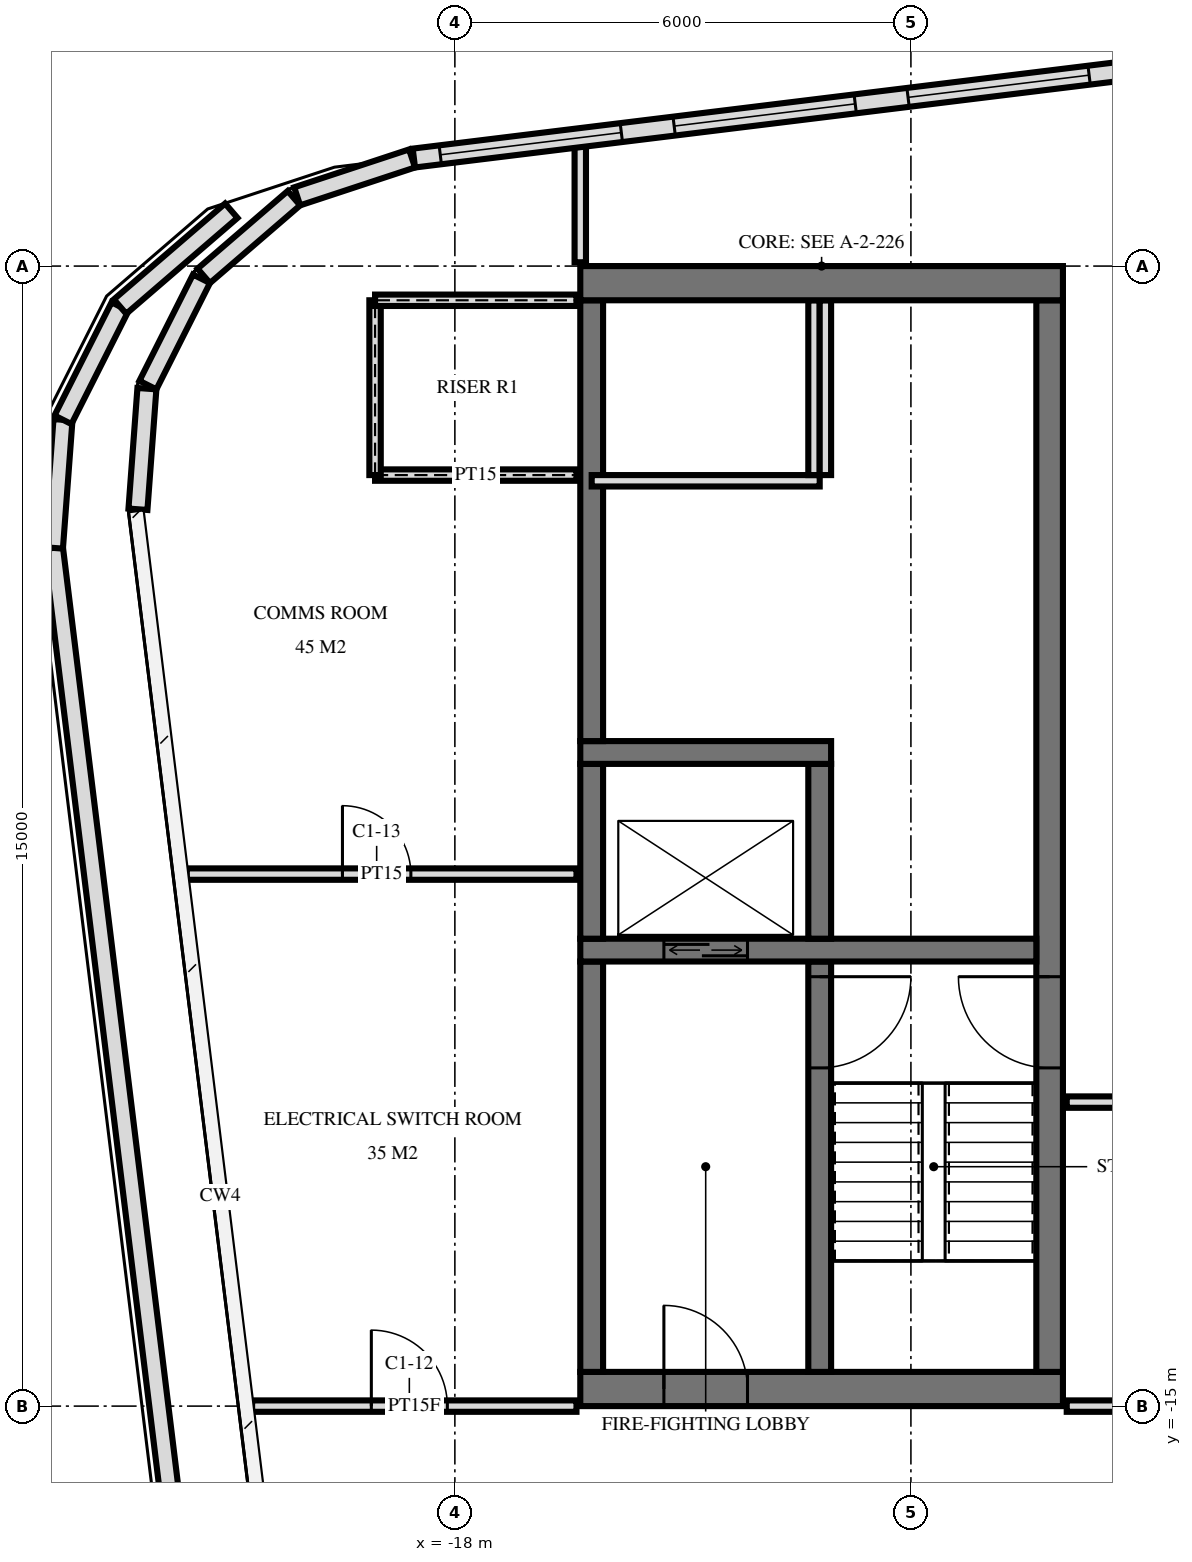
"""IFC4 building model, lengths in metres.
Left out: names, types, materials, properties, quantities, classifications, styles, units other than length and angle.
Written with IfcOpenShell. Run it as: python <this file> out.ifc"""

import sys

from ifc_helpers import new_model, si_unit, direction, frame, frame_2d, origin, place, context, subcontext, project, spatial, rectangle, extrude, element, fill, save


model = new_model("IFC4")
c1 = context("Model", 3, precision=1e-05, world=origin(), true_north=direction((0.0, 1.0)))
c2 = subcontext(c1, "Body", "Model", "MODEL_VIEW")
j1 = project(units=[si_unit("LENGTHUNIT", "METRE"), si_unit("PLANEANGLEUNIT", "RADIAN")], contexts=[c1])
p1 = place(None, origin())
s1 = spatial("IfcSite", under=j1, at=p1, CompositionType="ELEMENT")
p2 = place(p1, origin())
s2 = spatial("IfcBuilding", under=s1, at=p2, CompositionType="ELEMENT")
p3 = place(p2, frame((0.0, 0.0, 346.6)))
s3 = spatial("IfcBuildingStorey", under=s2, at=p3, CompositionType="ELEMENT", Elevation=346.6)
p4 = place(p3, frame((-16.35, -0.225, 0.0), z_axis=(0.0, 0.0, 1.0), x_axis=(1.0, 0.0, 0.0)))
e1 = element("IfcWall", 1, at=p4, inside=s3, PredefinedType="SHEAR", context=c2, shape_type="SweptSolid", body=[
    extrude(rectangle(XDim=6.35, YDim=0.45, at=frame_2d((3.175, 0.0))), origin(), (0.0, 0.0, 1.0), 3.6),
])
p5 = place(p3, frame((-16.35, -14.775, 0.0), z_axis=(0.0, 0.0, 1.0), x_axis=(1.0, 0.0, 0.0)))
e2 = element("IfcWall", 2, at=p5, inside=s3, PredefinedType="SHEAR", context=c2, shape_type="SweptSolid", body=[
    extrude(rectangle(XDim=6.35, YDim=0.45, at=frame_2d((3.175, 0.0))), origin(), (0.0, 0.0, 1.0), 3.6),
])
p6 = place(p5, frame((1.1, 0.0, 0.0)))
e3 = element("IfcOpeningElement", 3, at=p6, cuts=e2, PredefinedType="OPENING", context=c2, shape_type="SweptSolid", body=[
    extrude(rectangle(XDim=1.1, YDim=2.1, at=frame_2d((0.55, 1.05))), frame((0.0, 0.235, 0.0), z_axis=(0.0, -1.0, 0.0), x_axis=(1.0, 0.0, 0.0)), (0.0, 0.0, 1.0), 0.47),
])
p7 = place(p3, frame((-10.175, -14.55, 0.0), z_axis=(0.0, 0.0, 1.0), x_axis=(0.0, 1.0, 0.0)))
e4 = element("IfcWall", 4, at=p7, inside=s3, PredefinedType="SHEAR", context=c2, shape_type="SweptSolid", body=[
    extrude(rectangle(XDim=14.1, YDim=0.35, at=frame_2d((7.05, 0.0))), origin(), (0.0, 0.0, 1.0), 3.6),
])
p8 = place(p7, frame((4.0, 0.0, 0.0)))
e5 = element("IfcOpeningElement", 5, at=p8, cuts=e4, PredefinedType="OPENING", context=c2, shape_type="SweptSolid", body=[
    extrude(rectangle(XDim=1.2, YDim=2.1, at=frame_2d((0.6, 1.05))), frame((0.0, 0.185, 0.0), z_axis=(0.0, -1.0, 0.0), x_axis=(1.0, 0.0, 0.0)), (0.0, 0.0, 1.0), 0.37),
])
p9 = place(p3, frame((-16.2, -6.25, 0.0), z_axis=(0.0, 0.0, 1.0), x_axis=(0.0, 1.0, 0.0)))
e6 = element("IfcWall", 6, at=p9, inside=s3, PredefinedType="SHEAR", context=c2, shape_type="SweptSolid", body=[
    extrude(rectangle(XDim=5.8, YDim=0.3, at=frame_2d((2.9, 0.0))), origin(), (0.0, 0.0, 1.0), 3.6),
])
p10 = place(p3, frame((-16.2, -14.55, 0.0), z_axis=(0.0, 0.0, 1.0), x_axis=(0.0, 1.0, 0.0)))
e7 = element("IfcWall", 7, at=p10, inside=s3, PredefinedType="SHEAR", context=c2, shape_type="SweptSolid", body=[
    extrude(rectangle(XDim=5.4, YDim=0.3, at=frame_2d((2.7, 0.0))), origin(), (0.0, 0.0, 1.0), 3.6),
])
p11 = place(p3, frame((-16.35, -9.0, 0.0), z_axis=(0.0, 0.0, 1.0), x_axis=(1.0, 0.0, 0.0)))
e8 = element("IfcWall", 8, at=p11, inside=s3, PredefinedType="SHEAR", context=c2, shape_type="SweptSolid", body=[
    extrude(rectangle(XDim=6.0, YDim=0.3, at=frame_2d((3.0, 0.0))), origin(), (0.0, 0.0, 1.0), 3.6),
])
p12 = place(p11, frame((1.1, 0.0, 0.0)))
e9 = element("IfcOpeningElement", 9, at=p12, cuts=e8, PredefinedType="OPENING", context=c2, shape_type="SweptSolid", body=[
    extrude(rectangle(XDim=1.1, YDim=2.1, at=frame_2d((0.55, 1.05))), frame((0.0, 0.16, 0.0), z_axis=(0.0, -1.0, 0.0), x_axis=(1.0, 0.0, 0.0)), (0.0, 0.0, 1.0), 0.32),
])
p13 = place(p3, frame((-13.2, -14.55, 0.0), z_axis=(0.0, 0.0, 1.0), x_axis=(0.0, 1.0, 0.0)))
e10 = element("IfcWall", 10, at=p13, inside=s3, PredefinedType="SHEAR", context=c2, shape_type="SweptSolid", body=[
    extrude(rectangle(XDim=5.4, YDim=0.3, at=frame_2d((2.7, 0.0))), origin(), (0.0, 0.0, 1.0), 3.6),
])
p14 = place(p13, frame((4.0, 0.0, 0.0)))
e11 = element("IfcOpeningElement", 11, at=p14, cuts=e10, PredefinedType="OPENING", context=c2, shape_type="SweptSolid", body=[
    extrude(rectangle(XDim=1.2, YDim=2.1, at=frame_2d((0.6, 1.05))), frame((0.0, 0.16, 0.0), z_axis=(0.0, -1.0, 0.0), x_axis=(1.0, 0.0, 0.0)), (0.0, 0.0, 1.0), 0.32),
])
p15 = place(p3, frame((-16.35, -6.4, 0.0), z_axis=(0.0, 0.0, 1.0), x_axis=(1.0, 0.0, 0.0)))
e12 = element("IfcWall", 12, at=p15, inside=s3, PredefinedType="SHEAR", context=c2, shape_type="SweptSolid", body=[
    extrude(rectangle(XDim=3.3, YDim=0.3, at=frame_2d((1.65, 0.0))), origin(), (0.0, 0.0, 1.0), 3.6),
])
for number, where, z_axis, x_axis in (
    (13, (-13.2, -8.85, 0.0), (0.0, 0.0, 1.0), (0.0, 1.0, 0.0)),
    (14, (-16.2, -8.85, 0.0), (0.0, 0.0, 1.0), (0.0, 1.0, 0.0)),
):
    element("IfcWall", number, at=place(p3, frame(where, z_axis=z_axis, x_axis=x_axis)), inside=s3, PredefinedType="SHEAR", context=c2, shape_type="SweptSolid", body=[
        extrude(rectangle(XDim=2.3, YDim=0.3, at=frame_2d((1.15, 0.0))), origin(), (0.0, 0.0, 1.0), 3.6),
    ])
p16 = place(p3, frame((15.31, 5.577, 0.0), z_axis=(0.0, 0.0, 1.0), x_axis=(-0.992546767322, -0.12186432898, 0.0)))
e15 = element("IfcWall", 15, at=p16, inside=s3, PredefinedType="SOLIDWALL", context=c2, shape_type="SweptSolid", body=[
    extrude(rectangle(XDim=34.104, YDim=0.25, at=frame_2d((17.052, 0.0))), origin(), (0.0, 0.0, 1.0), 3.32),
])
p17 = place(p16, frame((0.35, 0.0, 0.498)))
e16 = element("IfcOpeningElement", 16, at=p17, cuts=e15, PredefinedType="OPENING", context=c2, shape_type="SweptSolid", body=[
    extrude(rectangle(XDim=2.4, YDim=2.622, at=frame_2d((1.2, 1.311))), frame((0.0, 0.135, 0.0), z_axis=(0.0, -1.0, 0.0), x_axis=(1.0, 0.0, 0.0)), (0.0, 0.0, 1.0), 0.27),
])
p18 = place(p16, frame((3.45, 0.0, 0.498)))
e17 = element("IfcOpeningElement", 17, at=p18, cuts=e15, PredefinedType="OPENING", context=c2, shape_type="SweptSolid", body=[
    extrude(rectangle(XDim=2.4, YDim=2.622, at=frame_2d((1.2, 1.311))), frame((0.0, 0.135, 0.0), z_axis=(0.0, -1.0, 0.0), x_axis=(1.0, 0.0, 0.0)), (0.0, 0.0, 1.0), 0.27),
])
p19 = place(p16, frame((6.551, 0.0, 0.498)))
e18 = element("IfcOpeningElement", 18, at=p19, cuts=e15, PredefinedType="OPENING", context=c2, shape_type="SweptSolid", body=[
    extrude(rectangle(XDim=2.4, YDim=2.622, at=frame_2d((1.2, 1.311))), frame((0.0, 0.135, 0.0), z_axis=(0.0, -1.0, 0.0), x_axis=(1.0, 0.0, 0.0)), (0.0, 0.0, 1.0), 0.27),
])
p20 = place(p16, frame((9.651, 0.0, 0.498)))
e19 = element("IfcOpeningElement", 19, at=p20, cuts=e15, PredefinedType="OPENING", context=c2, shape_type="SweptSolid", body=[
    extrude(rectangle(XDim=2.4, YDim=2.622, at=frame_2d((1.2, 1.311))), frame((0.0, 0.135, 0.0), z_axis=(0.0, -1.0, 0.0), x_axis=(1.0, 0.0, 0.0)), (0.0, 0.0, 1.0), 0.27),
])
p21 = place(p16, frame((12.751, 0.0, 0.498)))
e20 = element("IfcOpeningElement", 20, at=p21, cuts=e15, PredefinedType="OPENING", context=c2, shape_type="SweptSolid", body=[
    extrude(rectangle(XDim=2.4, YDim=2.622, at=frame_2d((1.2, 1.311))), frame((0.0, 0.135, 0.0), z_axis=(0.0, -1.0, 0.0), x_axis=(1.0, 0.0, 0.0)), (0.0, 0.0, 1.0), 0.27),
])
p22 = place(p16, frame((15.852, 0.0, 0.498)))
e21 = element("IfcOpeningElement", 21, at=p22, cuts=e15, PredefinedType="OPENING", context=c2, shape_type="SweptSolid", body=[
    extrude(rectangle(XDim=2.4, YDim=2.622, at=frame_2d((1.2, 1.311))), frame((0.0, 0.135, 0.0), z_axis=(0.0, -1.0, 0.0), x_axis=(1.0, 0.0, 0.0)), (0.0, 0.0, 1.0), 0.27),
])
p23 = place(p16, frame((18.952, 0.0, 0.498)))
e22 = element("IfcOpeningElement", 22, at=p23, cuts=e15, PredefinedType="OPENING", context=c2, shape_type="SweptSolid", body=[
    extrude(rectangle(XDim=2.4, YDim=2.622, at=frame_2d((1.2, 1.311))), frame((0.0, 0.135, 0.0), z_axis=(0.0, -1.0, 0.0), x_axis=(1.0, 0.0, 0.0)), (0.0, 0.0, 1.0), 0.27),
])
p24 = place(p16, frame((22.052, 0.0, 0.498)))
e23 = element("IfcOpeningElement", 23, at=p24, cuts=e15, PredefinedType="OPENING", context=c2, shape_type="SweptSolid", body=[
    extrude(rectangle(XDim=2.4, YDim=2.622, at=frame_2d((1.2, 1.311))), frame((0.0, 0.135, 0.0), z_axis=(0.0, -1.0, 0.0), x_axis=(1.0, 0.0, 0.0)), (0.0, 0.0, 1.0), 0.27),
])
p25 = place(p16, frame((25.153, 0.0, 0.498)))
e24 = element("IfcOpeningElement", 24, at=p25, cuts=e15, PredefinedType="OPENING", context=c2, shape_type="SweptSolid", body=[
    extrude(rectangle(XDim=2.4, YDim=2.622, at=frame_2d((1.2, 1.311))), frame((0.0, 0.135, 0.0), z_axis=(0.0, -1.0, 0.0), x_axis=(1.0, 0.0, 0.0)), (0.0, 0.0, 1.0), 0.27),
])
p26 = place(p16, frame((28.253, 0.0, 0.498)))
e25 = element("IfcOpeningElement", 25, at=p26, cuts=e15, PredefinedType="OPENING", context=c2, shape_type="SweptSolid", body=[
    extrude(rectangle(XDim=2.4, YDim=2.622, at=frame_2d((1.2, 1.311))), frame((0.0, 0.135, 0.0), z_axis=(0.0, -1.0, 0.0), x_axis=(1.0, 0.0, 0.0)), (0.0, 0.0, 1.0), 0.27),
])
p27 = place(p16, frame((31.353, 0.0, 0.498)))
e26 = element("IfcOpeningElement", 26, at=p27, cuts=e15, PredefinedType="OPENING", context=c2, shape_type="SweptSolid", body=[
    extrude(rectangle(XDim=2.4, YDim=2.622, at=frame_2d((1.2, 1.311))), frame((0.0, 0.135, 0.0), z_axis=(0.0, -1.0, 0.0), x_axis=(1.0, 0.0, 0.0)), (0.0, 0.0, 1.0), 0.27),
])
p28 = place(p3, frame((-18.563, 1.416, 0.0), z_axis=(0.0, 0.0, 1.0), x_axis=(-0.949660603473, -0.313280606186, 0.0)))
e27 = element("IfcWall", 27, at=p28, inside=s3, PredefinedType="SOLIDWALL", context=c2, shape_type="SweptSolid", body=[
    extrude(rectangle(XDim=1.591, YDim=0.25, at=frame_2d((0.796, 0.0))), origin(), (0.0, 0.0, 1.0), 3.32),
])
p29 = place(p3, frame((-20.117, 0.894, 0.0), z_axis=(0.0, 0.0, 1.0), x_axis=(-0.757614620138, -0.652702142905, 0.0)))
e28 = element("IfcWall", 28, at=p29, inside=s3, PredefinedType="SOLIDWALL", context=c2, shape_type="SweptSolid", body=[
    extrude(rectangle(XDim=1.566, YDim=0.25, at=frame_2d((0.783, 0.0))), origin(), (0.0, 0.0, 1.0), 3.32),
])
p30 = place(p3, frame((-21.334, -0.167, 0.0), z_axis=(0.0, 0.0, 1.0), x_axis=(-0.450141479344, -0.892957249018, 0.0)))
e29 = element("IfcWall", 29, at=p30, inside=s3, PredefinedType="SOLIDWALL", context=c2, shape_type="SweptSolid", body=[
    extrude(rectangle(XDim=1.566, YDim=0.25, at=frame_2d((0.783, 0.0))), origin(), (0.0, 0.0, 1.0), 3.32),
])
p31 = place(p3, frame((-22.052, -1.613, 0.0), z_axis=(0.0, 0.0, 1.0), x_axis=(-0.074103388081, -0.997250564239, 0.0)))
e30 = element("IfcWall", 30, at=p31, inside=s3, PredefinedType="SOLIDWALL", context=c2, shape_type="SweptSolid", body=[
    extrude(rectangle(XDim=1.591, YDim=0.25, at=frame_2d((0.796, 0.0))), origin(), (0.0, 0.0, 1.0), 3.32),
])
p32 = place(p3, frame((-20.947, -22.722, 0.0), z_axis=(0.0, 0.0, 1.0), x_axis=(-0.12187456146, 0.992545510931, 0.0)))
e31 = element("IfcWall", 31, at=p32, inside=s3, PredefinedType="PARAPET", context=c2, shape_type="SweptSolid", body=[
    extrude(rectangle(XDim=19.157, YDim=0.25, at=frame_2d((9.578, 0.0))), origin(), (0.0, 0.0, 1.0), 1.1),
])
p33 = place(p3, frame((-23.281, -3.708, 0.0), z_axis=(0.0, 0.0, 1.0), x_axis=(0.074089798327, 0.997251573969, 0.0)))
e32 = element("IfcWall", 32, at=p33, inside=s3, PredefinedType="PARAPET", context=c2, shape_type="SweptSolid", body=[
    extrude(rectangle(XDim=1.69, YDim=0.25, at=frame_2d((0.845, 0.0))), origin(), (0.0, 0.0, 1.0), 1.1),
])
p34 = place(p3, frame((-23.156, -2.022, 0.0), z_axis=(0.0, 0.0, 1.0), x_axis=(0.450137976098, 0.892959015003, 0.0)))
e33 = element("IfcWall", 33, at=p34, inside=s3, PredefinedType="PARAPET", context=c2, shape_type="SweptSolid", body=[
    extrude(rectangle(XDim=1.668, YDim=0.25, at=frame_2d((0.834, 0.0))), origin(), (0.0, 0.0, 1.0), 1.1),
])
p35 = place(p3, frame((-22.405, -0.533, 0.0), z_axis=(0.0, 0.0, 1.0), x_axis=(0.75760388344, 0.652714605166, 0.0)))
e34 = element("IfcWall", 34, at=p35, inside=s3, PredefinedType="PARAPET", context=c2, shape_type="SweptSolid", body=[
    extrude(rectangle(XDim=1.932, YDim=0.25, at=frame_2d((0.966, 0.0))), origin(), (0.0, 0.0, 1.0), 1.1),
])
p36 = place(p3, frame((-13.125, -2.75, 0.0), z_axis=(0.0, 0.0, 1.0), x_axis=(0.0, 1.0, 0.0)))
e35 = element("IfcWall", 35, at=p36, inside=s3, PredefinedType="PARTITIONING", context=c2, shape_type="SweptSolid", body=[
    extrude(rectangle(XDim=2.3, YDim=0.15, at=frame_2d((1.15, 0.0))), origin(), (0.0, 0.0, 1.0), 0.8),
])
p37 = place(p3, frame((-16.2, -2.825, 0.0), z_axis=(0.0, 0.0, 1.0), x_axis=(1.0, 0.0, 0.0)))
e36 = element("IfcWall", 36, at=p37, inside=s3, PredefinedType="PARTITIONING", context=c2, shape_type="SweptSolid", body=[
    extrude(rectangle(XDim=3.0, YDim=0.15, at=frame_2d((1.5, 0.0))), origin(), (0.0, 0.0, 1.0), 0.8),
])
p38 = place(p3, frame((-13.275, -2.75, 0.0), z_axis=(0.0, 0.0, 1.0), x_axis=(0.0, 1.0, 0.0)))
e37 = element("IfcWall", 37, at=p38, inside=s3, PredefinedType="PARTITIONING", context=c2, shape_type="SweptSolid", body=[
    extrude(rectangle(XDim=2.3, YDim=0.15, at=frame_2d((1.15, 0.0))), origin(), (0.0, 0.0, 1.0), 0.8),
])
p39 = place(p3, frame((-16.35, 0.05, 0.0), z_axis=(0.0, 0.0, 1.0), x_axis=(0.0, 1.0, 0.0)))
e38 = element("IfcWall", 38, at=p39, inside=s3, PredefinedType="PARTITIONING", context=c2, shape_type="SweptSolid", body=[
    extrude(rectangle(XDim=1.524, YDim=0.15, at=frame_2d((0.762, 0.0))), origin(), (0.0, 0.0, 1.0), 3.32),
])
p40 = place(p3, frame((-19.05, -2.75, 0.0), z_axis=(0.0, 0.0, 1.0), x_axis=(0.0, 1.0, 0.0)))
e39 = element("IfcWall", 39, at=p40, inside=s3, PredefinedType="PARTITIONING", context=c2, shape_type="SweptSolid", body=[
    extrude(rectangle(XDim=2.3, YDim=0.15, at=frame_2d((1.15, 0.0))), origin(), (0.0, 0.0, 1.0), 3.32),
])
p41 = place(p3, frame((-20.668, -15.0, 0.0), z_axis=(0.0, 0.0, 1.0), x_axis=(1.0, 0.0, 0.0)))
e40 = element("IfcWall", 40, at=p41, inside=s3, PredefinedType="PARTITIONING", context=c2, shape_type="SweptSolid", body=[
    extrude(rectangle(XDim=4.268, YDim=0.15, at=frame_2d((2.134, 0.0))), origin(), (0.0, 0.0, 1.0), 3.32),
])
p42 = place(p41, frame((1.569, 0.0, 0.0)))
e41 = element("IfcOpeningElement", 41, at=p42, cuts=e40, PredefinedType="OPENING", context=c2, shape_type="SweptSolid", body=[
    extrude(rectangle(XDim=1.0, YDim=2.1, at=frame_2d((0.5, 1.05))), frame((0.0, 0.085, 0.0), z_axis=(0.0, -1.0, 0.0), x_axis=(1.0, 0.0, 0.0)), (0.0, 0.0, 1.0), 0.17),
])
p43 = place(p3, frame((-9.95, -15.0, 0.0), z_axis=(0.0, 0.0, 1.0), x_axis=(1.0, 0.0, 0.0)))
e42 = element("IfcWall", 42, at=p43, inside=s3, PredefinedType="PARTITIONING", context=c2, shape_type="SweptSolid", body=[
    extrude(rectangle(XDim=19.9, YDim=0.15, at=frame_2d((9.95, 0.0))), origin(), (0.0, 0.0, 1.0), 2.684),
])
p44 = place(p43, frame((9.43, 0.0, 0.0)))
e43 = element("IfcOpeningElement", 43, at=p44, cuts=e42, PredefinedType="OPENING", context=c2, shape_type="SweptSolid", body=[
    extrude(rectangle(XDim=1.0, YDim=2.1, at=frame_2d((0.5, 1.05))), frame((0.0, 0.085, 0.0), z_axis=(0.0, -1.0, 0.0), x_axis=(1.0, 0.0, 0.0)), (0.0, 0.0, 1.0), 0.17),
])
p45 = place(p3, frame((-9.95, -11.0, 0.0), z_axis=(0.0, 0.0, 1.0), x_axis=(1.0, 0.0, 0.0)))
e44 = element("IfcWall", 44, at=p45, inside=s3, PredefinedType="PARTITIONING", context=c2, shape_type="SweptSolid", body=[
    extrude(rectangle(XDim=19.9, YDim=0.15, at=frame_2d((9.95, 0.0))), origin(), (0.0, 0.0, 1.0), 3.32),
])
p46 = place(p3, frame((-21.527, -8.0, 0.0), z_axis=(0.0, 0.0, 1.0), x_axis=(1.0, 0.0, 0.0)))
e45 = element("IfcWall", 45, at=p46, inside=s3, PredefinedType="PARTITIONING", context=c2, shape_type="SweptSolid", body=[
    extrude(rectangle(XDim=5.127, YDim=0.15, at=frame_2d((2.563, 0.0))), origin(), (0.0, 0.0, 1.0), 3.32),
])
p47 = place(p46, frame((2.048, 0.0, 0.0)))
e46 = element("IfcOpeningElement", 46, at=p47, cuts=e45, PredefinedType="OPENING", context=c2, shape_type="SweptSolid", body=[
    extrude(rectangle(XDim=0.9, YDim=2.1, at=frame_2d((0.45, 1.05))), frame((0.0, 0.085, 0.0), z_axis=(0.0, -1.0, 0.0), x_axis=(1.0, 0.0, 0.0)), (0.0, 0.0, 1.0), 0.17),
])
for number, where, z_axis, x_axis in (
    (47, (-19.05, -2.75, 0.0), (0.0, 0.0, 1.0), (1.0, 0.0, 0.0)),
    (48, (-19.05, -0.45, 0.0), (0.0, 0.0, 1.0), (1.0, 0.0, 0.0)),
):
    element("IfcWall", number, at=place(p3, frame(where, z_axis=z_axis, x_axis=x_axis)), inside=s3, PredefinedType="PARTITIONING", context=c2, shape_type="SweptSolid", body=[
        extrude(rectangle(XDim=2.65, YDim=0.15, at=frame_2d((1.325, 0.0))), origin(), (0.0, 0.0, 1.0), 3.32),
    ])
p48 = place(p25, origin())
e49 = element("IfcWindow", 49, at=p48, inside=s3, PartitioningType="SINGLE_PANEL", PredefinedType="USERDEFINED", context=c2, shape_type="SweptSolid", body=[
    extrude(rectangle(XDim=2.4, YDim=2.622, at=frame_2d((1.2, 1.311))), frame((0.0, 0.03, 0.0), z_axis=(0.0, -1.0, 0.0), x_axis=(1.0, 0.0, 0.0)), (0.0, 0.0, 1.0), 0.06),
])
fill(e24, e49)
p49 = place(p26, origin())
e50 = element("IfcWindow", 50, at=p49, inside=s3, PartitioningType="SINGLE_PANEL", PredefinedType="USERDEFINED", context=c2, shape_type="SweptSolid", body=[
    extrude(rectangle(XDim=2.4, YDim=2.622, at=frame_2d((1.2, 1.311))), frame((0.0, 0.03, 0.0), z_axis=(0.0, -1.0, 0.0), x_axis=(1.0, 0.0, 0.0)), (0.0, 0.0, 1.0), 0.06),
])
fill(e25, e50)
p50 = place(p27, origin())
e51 = element("IfcWindow", 51, at=p50, inside=s3, PartitioningType="SINGLE_PANEL", PredefinedType="USERDEFINED", context=c2, shape_type="SweptSolid", body=[
    extrude(rectangle(XDim=2.4, YDim=2.622, at=frame_2d((1.2, 1.311))), frame((0.0, 0.03, 0.0), z_axis=(0.0, -1.0, 0.0), x_axis=(1.0, 0.0, 0.0)), (0.0, 0.0, 1.0), 0.06),
])
fill(e26, e51)
p51 = place(p12, origin())
e52 = element("IfcDoor", 52, at=p51, inside=s3, OperationType="DOUBLE_DOOR_SLIDING", PredefinedType="USERDEFINED", context=c2, shape_type="SweptSolid", body=[
    extrude(rectangle(XDim=1.1, YDim=2.1, at=frame_2d((0.55, 1.05))), frame((0.0, 0.025, 0.0), z_axis=(0.0, -1.0, 0.0), x_axis=(1.0, 0.0, 0.0)), (0.0, 0.0, 1.0), 0.05),
])
fill(e9, e52)
p52 = place(p8, origin())
e53 = element("IfcDoor", 53, at=p52, inside=s3, OperationType="SINGLE_SWING_LEFT", PredefinedType="DOOR", context=c2, shape_type="SweptSolid", body=[
    extrude(rectangle(XDim=1.2, YDim=2.1, at=frame_2d((0.6, 1.05))), frame((0.0, 0.025, 0.0), z_axis=(0.0, -1.0, 0.0), x_axis=(1.0, 0.0, 0.0)), (0.0, 0.0, 1.0), 0.05),
])
fill(e5, e53)
p53 = place(p6, origin())
e54 = element("IfcDoor", 54, at=p53, inside=s3, OperationType="SINGLE_SWING_RIGHT", PredefinedType="DOOR", context=c2, shape_type="SweptSolid", body=[
    extrude(rectangle(XDim=1.1, YDim=2.1, at=frame_2d((0.55, 1.05))), frame((0.0, 0.025, 0.0), z_axis=(0.0, -1.0, 0.0), x_axis=(1.0, 0.0, 0.0)), (0.0, 0.0, 1.0), 0.05),
])
fill(e3, e54)
p54 = place(p14, frame((0.6, 0.0, 0.0), z_axis=(0.0, 0.0, 1.0), x_axis=(-1.0, 0.0, 0.0)))
e55 = element("IfcDoor", 55, at=p54, inside=s3, OperationType="SINGLE_SWING_RIGHT", PredefinedType="DOOR", context=c2, shape_type="SweptSolid", body=[
    extrude(rectangle(XDim=1.2, YDim=2.1, at=frame_2d((0.0, 1.05))), frame((0.0, -0.025, 0.0), z_axis=(0.0, 1.0, 0.0), x_axis=(-1.0, 0.0, 0.0)), (0.0, 0.0, 1.0), 0.05),
])
fill(e11, e55)
p55 = place(p42, origin())
e56 = element("IfcDoor", 56, at=p55, inside=s3, OperationType="SINGLE_SWING_RIGHT", PredefinedType="DOOR", context=c2, shape_type="SweptSolid", body=[
    extrude(rectangle(XDim=1.0, YDim=2.1, at=frame_2d((0.5, 1.05))), frame((0.0, 0.025, 0.0), z_axis=(0.0, -1.0, 0.0), x_axis=(1.0, 0.0, 0.0)), (0.0, 0.0, 1.0), 0.05),
])
fill(e41, e56)
p56 = place(p47, origin())
e57 = element("IfcDoor", 57, at=p56, inside=s3, OperationType="SINGLE_SWING_RIGHT", PredefinedType="DOOR", context=c2, shape_type="SweptSolid", body=[
    extrude(rectangle(XDim=0.9, YDim=2.1, at=frame_2d((0.45, 1.05))), frame((0.0, 0.025, 0.0), z_axis=(0.0, -1.0, 0.0), x_axis=(1.0, 0.0, 0.0)), (0.0, 0.0, 1.0), 0.05),
])
fill(e46, e57)
save(model, sys.argv[1])
